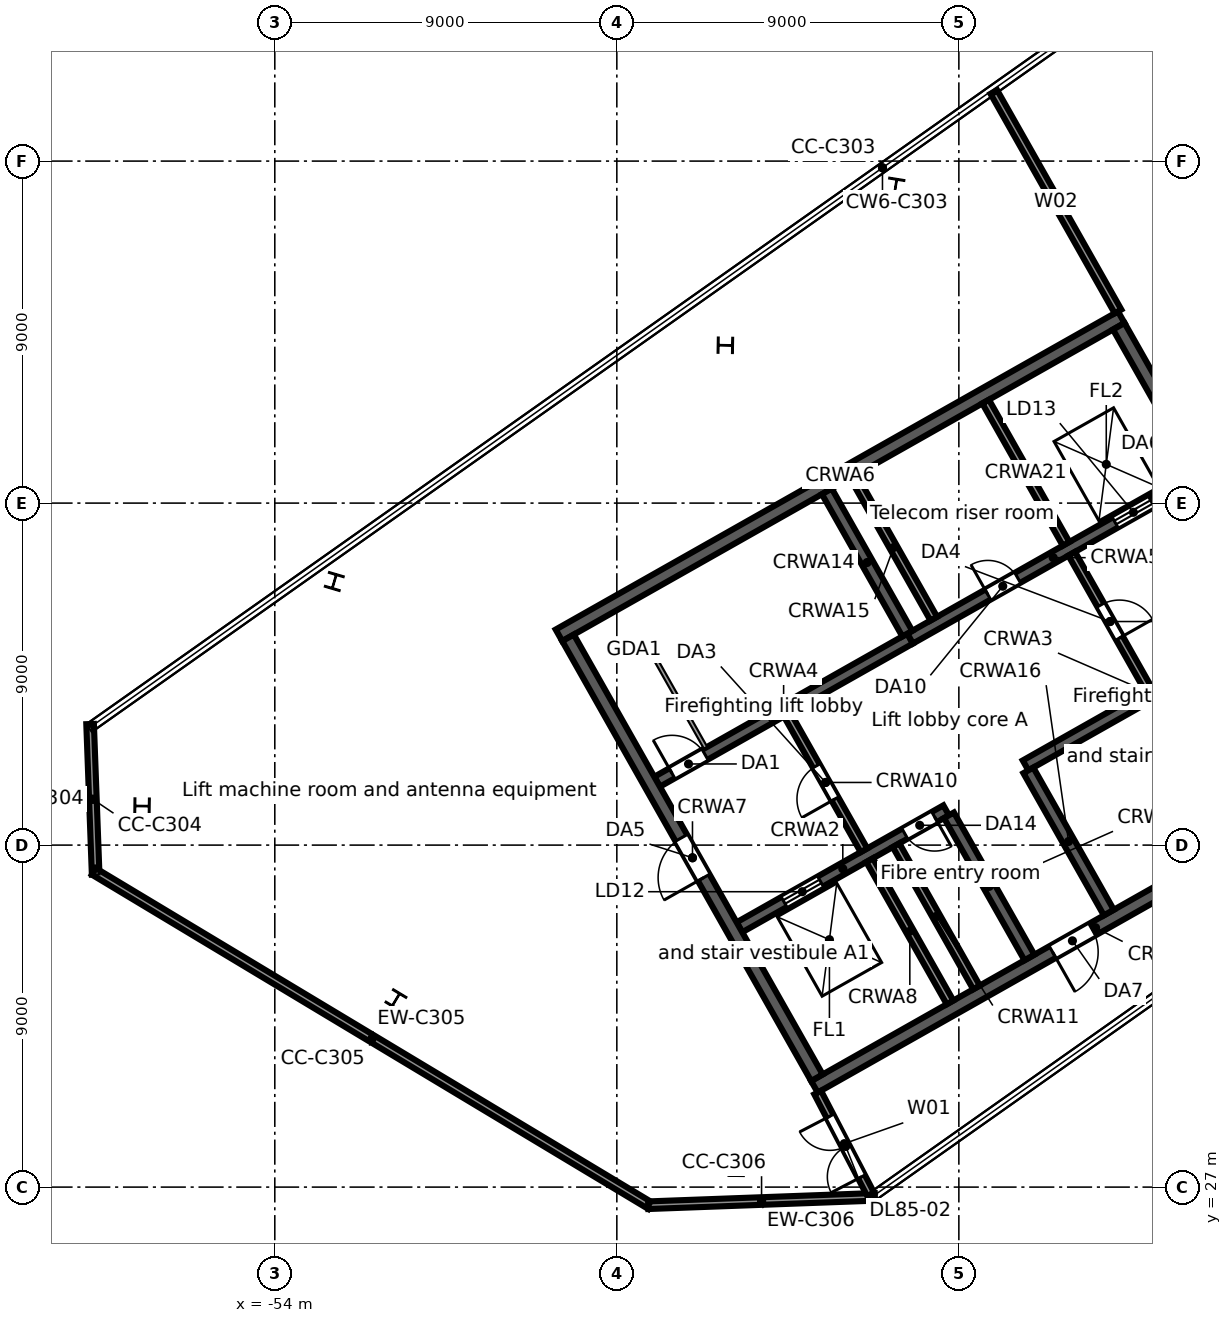
"""IFC4 building model, lengths in metres.
Left out: names, types, materials, properties, quantities, classifications, styles, units other than length and angle.
Written with IfcOpenShell. Run it as: python <this file> out.ifc"""

import sys

from ifc_helpers import new_model, si_unit, direction, frame, frame_2d, origin, origin_2d, place, context, subcontext, project, spatial, rectangle, i_section, extrude, element, fill, save


model = new_model("IFC4")
c1 = context("Model", 3, precision=1e-05, world=origin(), true_north=direction((0.0, 1.0)))
c2 = subcontext(c1, "Body", "Model", "MODEL_VIEW")
j1 = project(units=[si_unit("LENGTHUNIT", "METRE"), si_unit("PLANEANGLEUNIT", "RADIAN")], contexts=[c1])
p1 = place(None, origin())
s1 = spatial("IfcSite", under=j1, at=p1, CompositionType="ELEMENT")
p2 = place(p1, origin())
s2 = spatial("IfcBuilding", under=s1, at=p2, CompositionType="ELEMENT")
p3 = place(p2, frame((0.0, 0.0, 368.5)))
s3 = spatial("IfcBuildingStorey", under=s2, at=p3, CompositionType="ELEMENT", Elevation=368.5)
for number, where, z_axis, x_axis in (
    (1, (-57.493, 37.027, 0.0), (0.0, 0.0, 1.0), (-0.013, -1.0, 0.0)),
    (2, (-50.812, 31.931, 0.0), (0.0, 0.0, 1.0), (0.857, -0.515, 0.0)),
    (3, (-41.858, 27.495, 0.0), (0.0, 0.0, 1.0), (1.0, -0.013, 0.0)),
    (4, (-42.144, 49.153, 0.0), (0.0, 0.0, 1.0), (0.018, 1.0, 0.0)),
    (5, (-37.664, 53.334, 0.0), (0.0, 0.0, 1.0), (-0.987, 0.158, 0.0)),
    (6, (-52.435, 42.936, 0.0), (0.0, 0.0, 1.0), (-0.959, 0.283, 0.0)),
):
    element("IfcColumn", number, at=place(p3, frame(where, z_axis=z_axis, x_axis=x_axis)), inside=s3, PredefinedType="COLUMN", context=c2, shape_type="SweptSolid", body=[
        extrude(i_section(OverallWidth=0.4, OverallDepth=0.4, WebThickness=0.013, FlangeThickness=0.021, FilletRadius=0.022, at=origin_2d()), origin(), (0.0, 0.0, 1.0), 3.3),
    ])
p4 = place(p3, frame((-58.714, 35.226, 0.0), z_axis=(0.0, 0.0, 1.0), x_axis=(-0.036847570404, 0.999320897688, 0.0)))
e7 = element("IfcWall", 7, at=p4, inside=s3, PredefinedType="STANDARD", context=c2, shape_type="SweptSolid", body=[
    extrude(rectangle(XDim=3.962, YDim=0.2, at=frame_2d((1.981, 0.0))), origin(), (0.0, 0.0, 1.0), 3.6),
])
p5 = place(p3, frame((-44.119, 26.509, 0.0), z_axis=(0.0, 0.0, 1.0), x_axis=(-0.857168693653, 0.515035756644, 0.0)))
e8 = element("IfcWall", 8, at=p5, inside=s3, PredefinedType="STANDARD", context=c2, shape_type="SweptSolid", body=[
    extrude(rectangle(XDim=17.084, YDim=0.2, at=frame_2d((8.542, 0.0))), origin(), (0.0, 0.0, 1.0), 3.6),
])
p6 = place(p3, frame((-38.21, 26.744, 0.0), z_axis=(0.0, 0.0, 1.0), x_axis=(-0.999319030106, -0.036898185155, 0.0)))
e9 = element("IfcWall", 9, at=p6, inside=s3, PredefinedType="STANDARD", context=c2, shape_type="SweptSolid", body=[
    extrude(rectangle(XDim=5.968, YDim=0.2, at=frame_2d((2.984, 0.0))), origin(), (0.0, 0.0, 1.0), 3.6),
])
p7 = place(p3, frame((-39.801, 29.64, 0.0), z_axis=(0.0, 0.0, 1.0), x_axis=(0.870359753402, 0.492416388494, 0.0)))
e10 = element("IfcWall", 10, at=p7, inside=s3, PredefinedType="SOLIDWALL", context=c2, shape_type="SweptSolid", body=[
    extrude(rectangle(XDim=17.0, YDim=0.35, at=frame_2d((8.5, 0.0))), origin(), (0.0, 0.0, 1.0), 3.3),
])
p8 = place(p7, frame((7.2, 0.0, 0.0)))
e11 = element("IfcOpeningElement", 11, at=p8, cuts=e10, PredefinedType="OPENING", context=c2, shape_type="SweptSolid", body=[
    extrude(rectangle(XDim=1.2, YDim=2.1, at=frame_2d((0.6, 1.05))), frame((0.0, 0.185, 0.0), z_axis=(0.0, -1.0, 0.0), x_axis=(1.0, 0.0, 0.0)), (0.0, 0.0, 1.0), 0.37),
])
p9 = place(p3, frame((-41.774, 33.838, 0.0), z_axis=(0.0, 0.0, 1.0), x_axis=(0.870355415866, 0.492424055132, 0.0)))
e12 = element("IfcWall", 12, at=p9, inside=s3, PredefinedType="SOLIDWALL", context=c2, shape_type="SweptSolid", body=[
    extrude(rectangle(XDim=6.25, YDim=0.3, at=frame_2d((3.125, 0.0))), origin(), (0.0, 0.0, 1.0), 3.3),
])
p10 = place(p9, frame((1.35, 0.0, 0.0)))
e13 = element("IfcOpeningElement", 13, at=p10, cuts=e12, PredefinedType="OPENING", context=c2, shape_type="SweptSolid", body=[
    extrude(rectangle(XDim=1.1, YDim=2.1, at=frame_2d((0.55, 1.05))), frame((0.0, 0.16, 0.0), z_axis=(0.0, -1.0, 0.0), x_axis=(1.0, 0.0, 0.0)), (0.0, 0.0, 1.0), 0.32),
])
p11 = place(p9, frame((5.0, 0.0, 0.0)))
e14 = element("IfcOpeningElement", 14, at=p11, cuts=e12, PredefinedType="OPENING", context=c2, shape_type="SweptSolid", body=[
    extrude(rectangle(XDim=0.9, YDim=2.1, at=frame_2d((0.45, 1.05))), frame((0.0, 0.16, 0.0), z_axis=(0.0, -1.0, 0.0), x_axis=(1.0, 0.0, 0.0)), (0.0, 0.0, 1.0), 0.32),
])
p12 = place(p3, frame((-34.245, 38.097, 0.0), z_axis=(0.0, 0.0, 1.0), x_axis=(0.870352347706, 0.49242947804, 0.0)))
e15 = element("IfcWall", 15, at=p12, inside=s3, PredefinedType="SOLIDWALL", context=c2, shape_type="SweptSolid", body=[
    extrude(rectangle(XDim=7.65, YDim=0.3, at=frame_2d((3.825, 0.0))), origin(), (0.0, 0.0, 1.0), 3.3),
])
p13 = place(p12, frame((6.2, 0.0, 0.0)))
e16 = element("IfcOpeningElement", 16, at=p13, cuts=e15, PredefinedType="OPENING", context=c2, shape_type="SweptSolid", body=[
    extrude(rectangle(XDim=1.0, YDim=2.1, at=frame_2d((0.5, 1.05))), frame((0.0, 0.16, 0.0), z_axis=(0.0, -1.0, 0.0), x_axis=(1.0, 0.0, 0.0)), (0.0, 0.0, 1.0), 0.32),
])
p14 = place(p3, frame((-43.94, 37.667, 0.0), z_axis=(0.0, 0.0, 1.0), x_axis=(0.870352347706, 0.49242947804, 0.0)))
e17 = element("IfcWall", 17, at=p14, inside=s3, PredefinedType="SOLIDWALL", context=c2, shape_type="SweptSolid", body=[
    extrude(rectangle(XDim=7.65, YDim=0.3, at=frame_2d((3.825, 0.0))), origin(), (0.0, 0.0, 1.0), 3.3),
])
p15 = place(p14, frame((0.45, 0.0, 0.0)))
e18 = element("IfcOpeningElement", 18, at=p15, cuts=e17, PredefinedType="OPENING", context=c2, shape_type="SweptSolid", body=[
    extrude(rectangle(XDim=1.0, YDim=2.1, at=frame_2d((0.5, 1.05))), frame((0.0, 0.16, 0.0), z_axis=(0.0, -1.0, 0.0), x_axis=(1.0, 0.0, 0.0)), (0.0, 0.0, 1.0), 0.32),
])
p16 = place(p3, frame((-37.282, 41.435, 0.0), z_axis=(0.0, 0.0, 1.0), x_axis=(0.870364588774, 0.492407841741, 0.0)))
e19 = element("IfcWall", 19, at=p16, inside=s3, PredefinedType="SOLIDWALL", context=c2, shape_type="SweptSolid", body=[
    extrude(rectangle(XDim=8.65, YDim=0.3, at=frame_2d((4.325, 0.0))), origin(), (0.0, 0.0, 1.0), 3.3),
])
p17 = place(p16, frame((6.2, 0.0, 0.0)))
e20 = element("IfcOpeningElement", 20, at=p17, cuts=e19, PredefinedType="OPENING", context=c2, shape_type="SweptSolid", body=[
    extrude(rectangle(XDim=1.1, YDim=2.1, at=frame_2d((0.55, 1.05))), frame((0.0, 0.16, 0.0), z_axis=(0.0, -1.0, 0.0), x_axis=(1.0, 0.0, 0.0)), (0.0, 0.0, 1.0), 0.32),
])
p18 = place(p16, frame((2.35, 0.0, 0.0)))
e21 = element("IfcOpeningElement", 21, at=p18, cuts=e19, PredefinedType="OPENING", context=c2, shape_type="SweptSolid", body=[
    extrude(rectangle(XDim=0.9, YDim=2.1, at=frame_2d((0.45, 1.05))), frame((0.0, 0.16, 0.0), z_axis=(0.0, -1.0, 0.0), x_axis=(1.0, 0.0, 0.0)), (0.0, 0.0, 1.0), 0.32),
])
p19 = place(p3, frame((-46.522, 41.521, 0.0), z_axis=(0.0, 0.0, 1.0), x_axis=(0.870359753402, 0.492416388494, 0.0)))
e22 = element("IfcWall", 22, at=p19, inside=s3, PredefinedType="SOLIDWALL", context=c2, shape_type="SweptSolid", body=[
    extrude(rectangle(XDim=17.0, YDim=0.35, at=frame_2d((8.5, 0.0))), origin(), (0.0, 0.0, 1.0), 3.3),
])
p20 = place(p3, frame((-46.284, 41.454, 0.0), z_axis=(0.0, 0.0, 1.0), x_axis=(0.492429810477, -0.870352159619, 0.0)))
e23 = element("IfcWall", 23, at=p20, inside=s3, PredefinedType="SOLIDWALL", context=c2, shape_type="SweptSolid", body=[
    extrude(rectangle(XDim=13.3, YDim=0.35, at=frame_2d((6.65, 0.0))), origin(), (0.0, 0.0, 1.0), 3.3),
])
p21 = place(p20, frame((6.05, 0.0, 0.0)))
e24 = element("IfcOpeningElement", 24, at=p21, cuts=e23, PredefinedType="OPENING", context=c2, shape_type="SweptSolid", body=[
    extrude(rectangle(XDim=1.2, YDim=2.1, at=frame_2d((0.6, 1.05))), frame((0.0, 0.185, 0.0), z_axis=(0.0, -1.0, 0.0), x_axis=(1.0, 0.0, 0.0)), (0.0, 0.0, 1.0), 0.37),
])
p22 = place(p3, frame((-38.349, 35.603, 0.0), z_axis=(0.0, 0.0, 1.0), x_axis=(0.492410799949, -0.870362915164, 0.0)))
e25 = element("IfcWall", 25, at=p22, inside=s3, PredefinedType="SOLIDWALL", context=c2, shape_type="SweptSolid", body=[
    extrude(rectangle(XDim=4.3, YDim=0.2, at=frame_2d((2.15, 0.0))), origin(), (0.0, 0.0, 1.0), 3.3),
])
p23 = place(p3, frame((-40.516, 39.433, 0.0), z_axis=(0.0, 0.0, 1.0), x_axis=(0.492453559952, -0.87033872216, 0.0)))
e26 = element("IfcWall", 26, at=p23, inside=s3, PredefinedType="PARTITIONING", context=c2, shape_type="SweptSolid", body=[
    extrude(rectangle(XDim=4.1, YDim=0.2, at=frame_2d((2.05, 0.0))), origin(), (0.0, 0.0, 1.0), 3.3),
])
p24 = place(p23, frame((1.55, 0.0, 0.0)))
e27 = element("IfcOpeningElement", 27, at=p24, cuts=e26, PredefinedType="OPENING", context=c2, shape_type="SweptSolid", body=[
    extrude(rectangle(XDim=1.0, YDim=2.1, at=frame_2d((0.5, 1.05))), frame((0.0, 0.11, 0.0), z_axis=(0.0, -1.0, 0.0), x_axis=(1.0, 0.0, 0.0)), (0.0, 0.0, 1.0), 0.22),
])
p25 = place(p3, frame((-37.653, 35.997, 0.0), z_axis=(0.0, 0.0, 1.0), x_axis=(0.492435133428, -0.870349147967, 0.0)))
e28 = element("IfcWall", 28, at=p25, inside=s3, PredefinedType="SOLIDWALL", context=c2, shape_type="SweptSolid", body=[
    extrude(rectangle(XDim=4.3, YDim=0.2, at=frame_2d((2.15, 0.0))), origin(), (0.0, 0.0, 1.0), 3.3),
])
p26 = place(p3, frame((-36.26, 36.785, 0.0), z_axis=(0.0, 0.0, 1.0), x_axis=(0.492435133428, -0.870349147967, 0.0)))
e29 = element("IfcWall", 29, at=p26, inside=s3, PredefinedType="SOLIDWALL", context=c2, shape_type="SweptSolid", body=[
    extrude(rectangle(XDim=4.3, YDim=0.3, at=frame_2d((2.15, 0.0))), origin(), (0.0, 0.0, 1.0), 3.3),
])
p27 = place(p3, frame((-39.473, 45.308, 0.0), z_axis=(0.0, 0.0, 1.0), x_axis=(0.492410799949, -0.870362915164, 0.0)))
e30 = element("IfcWall", 30, at=p27, inside=s3, PredefinedType="SOLIDWALL", context=c2, shape_type="SweptSolid", body=[
    extrude(rectangle(XDim=4.3, YDim=0.3, at=frame_2d((2.15, 0.0))), origin(), (0.0, 0.0, 1.0), 3.3),
])
p28 = place(p3, frame((-38.777, 45.701, 0.0), z_axis=(0.0, 0.0, 1.0), x_axis=(0.492435133428, -0.870349147967, 0.0)))
e31 = element("IfcWall", 31, at=p28, inside=s3, PredefinedType="SOLIDWALL", context=c2, shape_type="SweptSolid", body=[
    extrude(rectangle(XDim=4.3, YDim=0.2, at=frame_2d((2.15, 0.0))), origin(), (0.0, 0.0, 1.0), 3.3),
])
p29 = place(p3, frame((-34.171, 37.967, 0.0), z_axis=(0.0, 0.0, 1.0), x_axis=(0.492435133428, -0.870349147967, 0.0)))
e32 = element("IfcWall", 32, at=p29, inside=s3, PredefinedType="SOLIDWALL", context=c2, shape_type="SweptSolid", body=[
    extrude(rectangle(XDim=4.3, YDim=0.3, at=frame_2d((2.15, 0.0))), origin(), (0.0, 0.0, 1.0), 3.3),
])
p30 = place(p3, frame((-33.031, 43.667, 0.0), z_axis=(0.0, 0.0, 1.0), x_axis=(0.492408451753, -0.87036424366, 0.0)))
e33 = element("IfcWall", 33, at=p30, inside=s3, PredefinedType="PARTITIONING", context=c2, shape_type="SweptSolid", body=[
    extrude(rectangle(XDim=4.1, YDim=0.2, at=frame_2d((2.05, 0.0))), origin(), (0.0, 0.0, 1.0), 3.3),
])
p31 = place(p30, frame((1.55, 0.0, 0.0)))
e34 = element("IfcOpeningElement", 34, at=p31, cuts=e33, PredefinedType="OPENING", context=c2, shape_type="SweptSolid", body=[
    extrude(rectangle(XDim=1.0, YDim=2.1, at=frame_2d((0.5, 1.05))), frame((0.0, 0.11, 0.0), z_axis=(0.0, -1.0, 0.0), x_axis=(1.0, 0.0, 0.0)), (0.0, 0.0, 1.0), 0.22),
])
p32 = place(p3, frame((-35.296, 47.671, 0.0), z_axis=(0.0, 0.0, 1.0), x_axis=(0.492435133428, -0.870349147967, 0.0)))
e35 = element("IfcWall", 35, at=p32, inside=s3, PredefinedType="SOLIDWALL", context=c2, shape_type="SweptSolid", body=[
    extrude(rectangle(XDim=4.3, YDim=0.2, at=frame_2d((2.15, 0.0))), origin(), (0.0, 0.0, 1.0), 3.3),
])
p33 = place(p3, frame((-31.792, 49.653, 0.0), z_axis=(0.0, 0.0, 1.0), x_axis=(0.492421943245, -0.870356610712, 0.0)))
e36 = element("IfcWall", 36, at=p33, inside=s3, PredefinedType="SOLIDWALL", context=c2, shape_type="SweptSolid", body=[
    extrude(rectangle(XDim=13.3, YDim=0.35, at=frame_2d((6.65, 0.0))), origin(), (0.0, 0.0, 1.0), 3.3),
])
p34 = place(p33, frame((6.05, 0.0, 0.0)))
e37 = element("IfcOpeningElement", 37, at=p34, cuts=e36, PredefinedType="OPENING", context=c2, shape_type="SweptSolid", body=[
    extrude(rectangle(XDim=1.2, YDim=2.1, at=frame_2d((0.6, 1.05))), frame((0.0, 0.185, 0.0), z_axis=(0.0, -1.0, 0.0), x_axis=(1.0, 0.0, 0.0)), (0.0, 0.0, 1.0), 0.37),
])
p35 = place(p3, frame((-39.715, 29.488, 0.0), z_axis=(0.0, 0.0, 1.0), x_axis=(0.461720517785, -0.887025458178, 0.0)))
e38 = element("IfcWall", 38, at=p35, inside=s3, PredefinedType="PARTITIONING", context=c2, shape_type="SweptSolid", body=[
    extrude(rectangle(XDim=3.03, YDim=0.2, at=frame_2d((1.515, 0.0))), origin(), (0.0, 0.0, 1.0), 3.3),
])
p36 = place(p35, frame((0.7, 0.0, 0.0)))
e39 = element("IfcOpeningElement", 39, at=p36, cuts=e38, PredefinedType="OPENING", context=c2, shape_type="SweptSolid", body=[
    extrude(rectangle(XDim=1.8, YDim=2.1, at=frame_2d((0.9, 1.05))), frame((0.0, 0.11, 0.0), z_axis=(0.0, -1.0, 0.0), x_axis=(1.0, 0.0, 0.0)), (0.0, 0.0, 1.0), 0.22),
])
p37 = place(p3, frame((-35.08, 55.819, 0.0), z_axis=(0.0, 0.0, 1.0), x_axis=(0.49249727422, -0.870313986379, 0.0)))
e40 = element("IfcWall", 40, at=p37, inside=s3, PredefinedType="PARTITIONING", context=c2, shape_type="SweptSolid", body=[
    extrude(rectangle(XDim=6.636, YDim=0.2, at=frame_2d((3.318, 0.0))), origin(), (0.0, 0.0, 1.0), 3.3),
])
p38 = place(p17, origin())
e41 = element("IfcDoor", 41, at=p38, inside=s3, OperationType="DOUBLE_DOOR_SLIDING", PredefinedType="DOOR", context=c2, shape_type="SweptSolid", body=[
    extrude(rectangle(XDim=1.1, YDim=2.1, at=frame_2d((0.55, 1.05))), frame((0.0, 0.025, 0.0), z_axis=(0.0, -1.0, 0.0), x_axis=(1.0, 0.0, 0.0)), (0.0, 0.0, 1.0), 0.05),
])
fill(e20, e41)
p39 = place(p10, origin())
e42 = element("IfcDoor", 42, at=p39, inside=s3, OperationType="DOUBLE_DOOR_SLIDING", PredefinedType="DOOR", context=c2, shape_type="SweptSolid", body=[
    extrude(rectangle(XDim=1.1, YDim=2.1, at=frame_2d((0.55, 1.05))), frame((0.0, 0.025, 0.0), z_axis=(0.0, -1.0, 0.0), x_axis=(1.0, 0.0, 0.0)), (0.0, 0.0, 1.0), 0.05),
])
fill(e13, e42)
p40 = place(p15, origin())
e43 = element("IfcDoor", 43, at=p40, inside=s3, OperationType="SINGLE_SWING_LEFT", PredefinedType="DOOR", context=c2, shape_type="SweptSolid", body=[
    extrude(rectangle(XDim=1.0, YDim=2.1, at=frame_2d((0.5, 1.05))), frame((0.0, 0.025, 0.0), z_axis=(0.0, -1.0, 0.0), x_axis=(1.0, 0.0, 0.0)), (0.0, 0.0, 1.0), 0.05),
])
fill(e18, e43)
p41 = place(p24, frame((1.0, 0.0, 0.0), z_axis=(0.0, 0.0, 1.0), x_axis=(-1.0, 0.0, 0.0)))
e44 = element("IfcDoor", 44, at=p41, inside=s3, OperationType="SINGLE_SWING_LEFT", PredefinedType="DOOR", context=c2, shape_type="SweptSolid", body=[
    extrude(rectangle(XDim=1.0, YDim=2.1, at=frame_2d((0.5, 1.05))), frame((0.0, 0.025, 0.0), z_axis=(0.0, -1.0, 0.0), x_axis=(1.0, 0.0, 0.0)), (0.0, 0.0, 1.0), 0.05),
])
fill(e27, e44)
p42 = place(p21, frame((1.2, 0.0, 0.0), z_axis=(0.0, 0.0, 1.0), x_axis=(-1.0, 0.0, 0.0)))
e45 = element("IfcDoor", 45, at=p42, inside=s3, OperationType="SINGLE_SWING_LEFT", PredefinedType="DOOR", context=c2, shape_type="SweptSolid", body=[
    extrude(rectangle(XDim=1.2, YDim=2.1, at=frame_2d((0.6, 1.05))), frame((0.0, 0.025, 0.0), z_axis=(0.0, -1.0, 0.0), x_axis=(1.0, 0.0, 0.0)), (0.0, 0.0, 1.0), 0.05),
])
fill(e24, e45)
p43 = place(p31, origin())
e46 = element("IfcDoor", 46, at=p43, inside=s3, OperationType="SINGLE_SWING_RIGHT", PredefinedType="DOOR", context=c2, shape_type="SweptSolid", body=[
    extrude(rectangle(XDim=1.0, YDim=2.1, at=frame_2d((0.5, 1.05))), frame((0.0, 0.025, 0.0), z_axis=(0.0, -1.0, 0.0), x_axis=(1.0, 0.0, 0.0)), (0.0, 0.0, 1.0), 0.05),
])
fill(e34, e46)
p44 = place(p8, frame((1.2, 0.0, 0.0), z_axis=(0.0, 0.0, 1.0), x_axis=(-1.0, 0.0, 0.0)))
e47 = element("IfcDoor", 47, at=p44, inside=s3, OperationType="SINGLE_SWING_RIGHT", PredefinedType="DOOR", context=c2, shape_type="SweptSolid", body=[
    extrude(rectangle(XDim=1.2, YDim=2.1, at=frame_2d((0.6, 1.05))), frame((0.0, 0.025, 0.0), z_axis=(0.0, -1.0, 0.0), x_axis=(1.0, 0.0, 0.0)), (0.0, 0.0, 1.0), 0.05),
])
fill(e11, e47)
p45 = place(p18, origin())
e48 = element("IfcDoor", 48, at=p45, inside=s3, OperationType="SINGLE_SWING_LEFT", PredefinedType="DOOR", context=c2, shape_type="SweptSolid", body=[
    extrude(rectangle(XDim=0.9, YDim=2.1, at=frame_2d((0.45, 1.05))), frame((0.0, 0.025, 0.0), z_axis=(0.0, -1.0, 0.0), x_axis=(1.0, 0.0, 0.0)), (0.0, 0.0, 1.0), 0.05),
])
fill(e21, e48)
p46 = place(p11, frame((0.9, 0.0, 0.0), z_axis=(0.0, 0.0, 1.0), x_axis=(-1.0, 0.0, 0.0)))
e49 = element("IfcDoor", 49, at=p46, inside=s3, OperationType="SINGLE_SWING_LEFT", PredefinedType="DOOR", context=c2, shape_type="SweptSolid", body=[
    extrude(rectangle(XDim=0.9, YDim=2.1, at=frame_2d((0.45, 1.05))), frame((0.0, 0.025, 0.0), z_axis=(0.0, -1.0, 0.0), x_axis=(1.0, 0.0, 0.0)), (0.0, 0.0, 1.0), 0.05),
])
fill(e14, e49)
p47 = place(p36, frame((1.8, 0.0, 0.0), z_axis=(0.0, 0.0, 1.0), x_axis=(-1.0, 0.0, 0.0)))
e50 = element("IfcDoor", 50, at=p47, inside=s3, OperationType="DOUBLE_DOOR_SINGLE_SWING", PredefinedType="DOOR", context=c2, shape_type="SweptSolid", body=[
    extrude(rectangle(XDim=1.8, YDim=2.1, at=frame_2d((0.9, 1.05))), frame((0.0, 0.025, 0.0), z_axis=(0.0, -1.0, 0.0), x_axis=(1.0, 0.0, 0.0)), (0.0, 0.0, 1.0), 0.05),
])
fill(e39, e50)
save(model, sys.argv[1])
